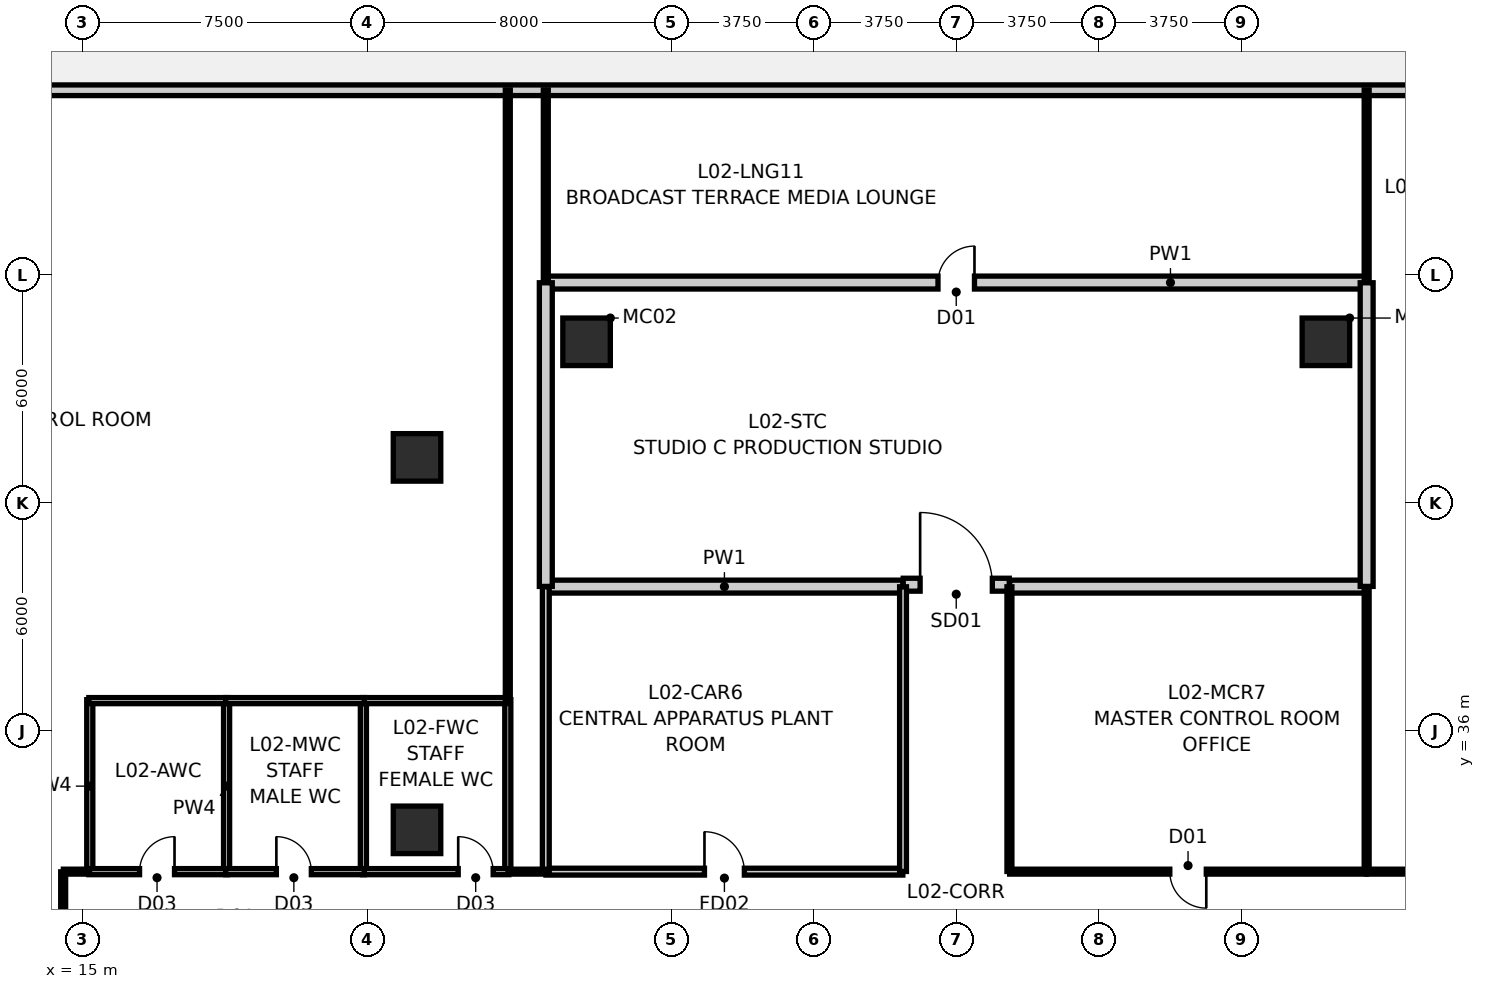
"""IFC4 building model, lengths in metres.
Left out: names, types, materials, properties, quantities, classifications, styles, units other than length and angle.
Written with IfcOpenShell. Run it as: python <this file> out.ifc"""

import sys

from ifc_helpers import new_model, si_unit, direction, frame, frame_2d, origin, origin_2d, place, context, subcontext, project, spatial, rectangle, hollow_rectangle, extrude, source, transform, mapped, element, fill, save


model = new_model("IFC4")
c1 = context("Model", 3, precision=1e-05, world=origin(), true_north=direction((0.0, 1.0)))
c2 = subcontext(c1, "Body", "Model", "MODEL_VIEW")
j1 = project(units=[si_unit("LENGTHUNIT", "METRE"), si_unit("PLANEANGLEUNIT", "RADIAN")], contexts=[c1])
p1 = place(None, origin())
s1 = spatial("IfcSite", under=j1, at=p1, CompositionType="ELEMENT")
p2 = place(p1, origin())
s2 = spatial("IfcBuilding", under=s1, at=p2, CompositionType="ELEMENT")
p3 = place(p2, frame((0.0, 0.0, 10.2)))
s3 = spatial("IfcBuildingStorey", under=s2, at=p3, CompositionType="ELEMENT", Elevation=10.2)
m1 = source(origin(), c2, "Body", "SweptSolid", [
    extrude(hollow_rectangle(XDim=1.25, YDim=1.25, WallThickness=0.07, at=origin_2d()), origin(), (0.0, 0.0, 1.0), 4.501),
])
for number, where, z_axis, x_axis in (
    (1, (47.727, 46.241, 0.0), (-0.024, 0.002, 1.0), (-0.072, -0.997, 0.0)),
    (2, (28.273, 46.241, 0.0), (0.024, 0.002, 1.0), (-0.072, 0.997, 0.0)),
):
    element("IfcColumn", number, at=place(p3, frame(where, z_axis=z_axis, x_axis=x_axis)), inside=s3, PredefinedType="COLUMN", context=c2, shape_type="MappedRepresentation", body=[
        mapped(m1, transform((0.0, 0.0, 0.0), scale=1.0)),
    ])
m2 = source(origin(), c2, "Body", "SweptSolid", [
    extrude(hollow_rectangle(XDim=1.25, YDim=1.25, WallThickness=0.07, at=origin_2d()), origin(), (0.0, 0.0, 1.0), 4.5),
])
for number, where, z_axis, x_axis in (
    (3, (23.811, 33.4, 0.0), (0.0, 0.0, 1.0), (1.0, 0.0, 0.0)),
    (4, (23.811, 43.2, 0.0), (0.0, 0.0, 1.0), (1.0, 0.0, 0.0)),
):
    element("IfcColumn", number, at=place(p3, frame(where, z_axis=z_axis, x_axis=x_axis)), inside=s3, PredefinedType="COLUMN", context=c2, shape_type="MappedRepresentation", body=[
        mapped(m2, transform((0.0, 0.0, 0.0), scale=1.0)),
    ])
p4 = place(p3, frame((6.861, 52.86, 0.0), z_axis=(0.0, 0.0, 1.0), x_axis=(1.0, 0.0, 0.0)))
e5 = element("IfcWall", 5, at=p4, inside=s3, PredefinedType="STANDARD", context=c2, shape_type="SweptSolid", body=[
    extrude(rectangle(XDim=64.278, YDim=0.28, at=frame_2d((32.139, 0.0))), origin(), (0.0, 0.0, 1.0), 4.18),
])
for number, where, z_axis, x_axis in (
    (6, (15.2, 32.275, 0.0), (0.0, 0.0, 1.0), (0.0, 1.0, 0.0)),
    (7, (18.8, 32.275, 0.0), (0.0, 0.0, 1.0), (0.0, 1.0, 0.0)),
    (8, (22.4, 32.275, 0.0), (0.0, 0.0, 1.0), (0.0, 1.0, 0.0)),
    (9, (26.2, 32.275, 0.0), (0.0, 0.0, 1.0), (0.0, 1.0, 0.0)),
):
    element("IfcWall", number, at=place(p3, frame(where, z_axis=z_axis, x_axis=x_axis)), inside=s3, PredefinedType="PLUMBINGWALL", context=c2, shape_type="SweptSolid", body=[
        extrude(rectangle(XDim=4.55, YDim=0.16, at=frame_2d((2.275, 0.0))), origin(), (0.0, 0.0, 1.0), 4.18),
    ])
p5 = place(p3, frame((22.375, 32.3, 0.0), z_axis=(0.0, 0.0, 1.0), x_axis=(1.0, 0.0, 0.0)))
e10 = element("IfcWall", 10, at=p5, inside=s3, PredefinedType="PLUMBINGWALL", context=c2, shape_type="SweptSolid", body=[
    extrude(rectangle(XDim=3.85, YDim=0.16, at=frame_2d((1.925, 0.0))), origin(), (0.0, 0.0, 1.0), 4.18),
])
p6 = place(p5, frame((2.52, 0.0, 0.0)))
e11 = element("IfcOpeningElement", 11, at=p6, cuts=e10, PredefinedType="OPENING", context=c2, shape_type="SweptSolid", body=[
    extrude(rectangle(XDim=0.92, YDim=2.1, at=frame_2d((0.46, 1.05))), frame((0.0, 0.092, 0.0), z_axis=(0.0, -1.0, 0.0), x_axis=(1.0, 0.0, 0.0)), (0.0, 0.0, 1.0), 0.184),
])
p7 = place(p3, frame((22.375, 36.8, 0.0), z_axis=(0.0, 0.0, 1.0), x_axis=(1.0, 0.0, 0.0)))
e12 = element("IfcWall", 12, at=p7, inside=s3, PredefinedType="PLUMBINGWALL", context=c2, shape_type="SweptSolid", body=[
    extrude(rectangle(XDim=3.85, YDim=0.16, at=frame_2d((1.925, 0.0))), origin(), (0.0, 0.0, 1.0), 4.18),
])
p8 = place(p3, frame((15.175, 32.3, 0.0), z_axis=(0.0, 0.0, 1.0), x_axis=(1.0, 0.0, 0.0)))
e13 = element("IfcWall", 13, at=p8, inside=s3, PredefinedType="PLUMBINGWALL", context=c2, shape_type="SweptSolid", body=[
    extrude(rectangle(XDim=3.65, YDim=0.16, at=frame_2d((1.825, 0.0))), origin(), (0.0, 0.0, 1.0), 4.18),
])
p9 = place(p8, frame((1.335, 0.0, 0.0)))
e14 = element("IfcOpeningElement", 14, at=p9, cuts=e13, PredefinedType="OPENING", context=c2, shape_type="SweptSolid", body=[
    extrude(rectangle(XDim=0.92, YDim=2.1, at=frame_2d((0.46, 1.05))), frame((0.0, 0.092, 0.0), z_axis=(0.0, -1.0, 0.0), x_axis=(1.0, 0.0, 0.0)), (0.0, 0.0, 1.0), 0.184),
])
p10 = place(p3, frame((15.175, 36.8, 0.0), z_axis=(0.0, 0.0, 1.0), x_axis=(1.0, 0.0, 0.0)))
e15 = element("IfcWall", 15, at=p10, inside=s3, PredefinedType="PLUMBINGWALL", context=c2, shape_type="SweptSolid", body=[
    extrude(rectangle(XDim=3.65, YDim=0.16, at=frame_2d((1.825, 0.0))), origin(), (0.0, 0.0, 1.0), 4.18),
])
p11 = place(p3, frame((18.775, 32.3, 0.0), z_axis=(0.0, 0.0, 1.0), x_axis=(1.0, 0.0, 0.0)))
e16 = element("IfcWall", 16, at=p11, inside=s3, PredefinedType="PLUMBINGWALL", context=c2, shape_type="SweptSolid", body=[
    extrude(rectangle(XDim=3.65, YDim=0.16, at=frame_2d((1.825, 0.0))), origin(), (0.0, 0.0, 1.0), 4.18),
])
p12 = place(p11, frame((1.335, 0.0, 0.0)))
e17 = element("IfcOpeningElement", 17, at=p12, cuts=e16, PredefinedType="OPENING", context=c2, shape_type="SweptSolid", body=[
    extrude(rectangle(XDim=0.92, YDim=2.1, at=frame_2d((0.46, 1.05))), frame((0.0, 0.092, 0.0), z_axis=(0.0, -1.0, 0.0), x_axis=(1.0, 0.0, 0.0)), (0.0, 0.0, 1.0), 0.184),
])
p13 = place(p3, frame((18.775, 36.8, 0.0), z_axis=(0.0, 0.0, 1.0), x_axis=(1.0, 0.0, 0.0)))
e18 = element("IfcWall", 18, at=p13, inside=s3, PredefinedType="PLUMBINGWALL", context=c2, shape_type="SweptSolid", body=[
    extrude(rectangle(XDim=3.65, YDim=0.16, at=frame_2d((1.825, 0.0))), origin(), (0.0, 0.0, 1.0), 4.18),
])
p14 = place(p3, frame((27.205, 47.8, 0.0), z_axis=(0.0, 0.0, 1.0), x_axis=(1.0, 0.0, 0.0)))
e19 = element("IfcWall", 19, at=p14, inside=s3, PredefinedType="PARTITIONING", context=c2, shape_type="SweptSolid", body=[
    extrude(rectangle(XDim=21.59, YDim=0.34, at=frame_2d((10.795, 0.0))), origin(), (0.0, 0.0, 1.0), 4.18),
])
p15 = place(p14, frame((10.315, 0.0, 0.0)))
e20 = element("IfcOpeningElement", 20, at=p15, cuts=e19, PredefinedType="OPENING", context=c2, shape_type="SweptSolid", body=[
    extrude(rectangle(XDim=0.96, YDim=2.15, at=frame_2d((0.48, 1.075))), frame((0.0, 0.182, 0.0), z_axis=(0.0, -1.0, 0.0), x_axis=(1.0, 0.0, 0.0)), (0.0, 0.0, 1.0), 0.364),
])
for number, where, z_axis, x_axis in (
    (21, (27.205, 39.8, 0.0), (0.0, 0.0, 1.0), (1.0, 0.0, 0.0)),
    (22, (39.405, 39.8, 0.0), (0.0, 0.0, 1.0), (1.0, 0.0, 0.0)),
):
    element("IfcWall", number, at=place(p3, frame(where, z_axis=z_axis, x_axis=x_axis)), inside=s3, PredefinedType="PARTITIONING", context=c2, shape_type="SweptSolid", body=[
        extrude(rectangle(XDim=9.39, YDim=0.34, at=frame_2d((4.695, 0.0))), origin(), (0.0, 0.0, 1.0), 4.18),
    ])
for number, where, z_axis, x_axis in (
    (23, (27.2, 39.805, 0.0), (0.0, 0.0, 1.0), (0.0, 1.0, 0.0)),
    (24, (48.8, 39.805, 0.0), (0.0, 0.0, 1.0), (0.0, 1.0, 0.0)),
):
    element("IfcWall", number, at=place(p3, frame(where, z_axis=z_axis, x_axis=x_axis)), inside=s3, PredefinedType="PARTITIONING", context=c2, shape_type="SweptSolid", body=[
        extrude(rectangle(XDim=7.99, YDim=0.34, at=frame_2d((3.995, 0.0))), origin(), (0.0, 0.0, 1.0), 4.18),
    ])
p16 = place(p3, frame((36.605, 39.85, 0.0), z_axis=(0.0, 0.0, 1.0), x_axis=(1.0, 0.0, 0.0)))
e25 = element("IfcWall", 25, at=p16, inside=s3, PredefinedType="PARTITIONING", context=c2, shape_type="SweptSolid", body=[
    extrude(rectangle(XDim=2.79, YDim=0.34, at=frame_2d((1.395, 0.0))), origin(), (0.0, 0.0, 1.0), 4.18),
])
p17 = place(p16, frame((0.445, 0.0, 0.0)))
e26 = element("IfcOpeningElement", 26, at=p17, cuts=e25, PredefinedType="OPENING", context=c2, shape_type="SweptSolid", body=[
    extrude(rectangle(XDim=1.9, YDim=2.35, at=frame_2d((0.95, 1.175))), frame((0.0, 0.182, 0.0), z_axis=(0.0, -1.0, 0.0), x_axis=(1.0, 0.0, 0.0)), (0.0, 0.0, 1.0), 0.364),
])
p18 = place(p3, frame((27.205, 32.3, 0.0), z_axis=(0.0, 0.0, 1.0), x_axis=(1.0, 0.0, 0.0)))
e27 = element("IfcWall", 27, at=p18, inside=s3, PredefinedType="PARTITIONING", context=c2, shape_type="SweptSolid", body=[
    extrude(rectangle(XDim=9.39, YDim=0.18, at=frame_2d((4.695, 0.0))), origin(), (0.0, 0.0, 1.0), 4.18),
])
p19 = place(p18, frame((4.17, 0.0, 0.0)))
e28 = element("IfcOpeningElement", 28, at=p19, cuts=e27, PredefinedType="OPENING", context=c2, shape_type="SweptSolid", body=[
    extrude(rectangle(XDim=1.05, YDim=2.15, at=frame_2d((0.525, 1.075))), frame((0.0, 0.102, 0.0), z_axis=(0.0, -1.0, 0.0), x_axis=(1.0, 0.0, 0.0)), (0.0, 0.0, 1.0), 0.204),
])
for number, where, z_axis, x_axis in (
    (29, (36.6, 32.305, 0.0), (0.0, 0.0, 1.0), (0.0, 1.0, 0.0)),
    (30, (27.2, 32.305, 0.0), (0.0, 0.0, 1.0), (0.0, 1.0, 0.0)),
):
    element("IfcWall", number, at=place(p3, frame(where, z_axis=z_axis, x_axis=x_axis)), inside=s3, PredefinedType="PARTITIONING", context=c2, shape_type="SweptSolid", body=[
        extrude(rectangle(XDim=7.49, YDim=0.18, at=frame_2d((3.745, 0.0))), origin(), (0.0, 0.0, 1.0), 4.18),
    ])
p20 = place(p3, frame((26.2, 52.87, 0.0), z_axis=(0.0, 0.0, 1.0), x_axis=(0.0, -1.0, 0.0)))
e31 = element("IfcWall", 31, at=p20, inside=s3, PredefinedType="PARTITIONING", context=c2, shape_type="SweptSolid", body=[
    extrude(rectangle(XDim=16.065, YDim=0.13, at=frame_2d((8.033, 0.0))), origin(), (0.0, 0.0, 1.0), 4.18),
])
p21 = place(p3, frame((48.795, 32.3, 0.0), z_axis=(0.0, 0.0, 1.0), x_axis=(-1.0, 0.0, 0.0)))
e32 = element("IfcWall", 32, at=p21, inside=s3, PredefinedType="PARTITIONING", context=c2, shape_type="SweptSolid", body=[
    extrude(rectangle(XDim=9.39, YDim=0.13, at=frame_2d((4.695, 0.0))), origin(), (0.0, 0.0, 1.0), 4.18),
])
p22 = place(p21, frame((4.215, 0.0, 0.0)))
e33 = element("IfcOpeningElement", 33, at=p22, cuts=e32, PredefinedType="OPENING", context=c2, shape_type="SweptSolid", body=[
    extrude(rectangle(XDim=0.96, YDim=2.15, at=frame_2d((0.48, 1.075))), frame((0.0, 0.077, 0.0), z_axis=(0.0, -1.0, 0.0), x_axis=(1.0, 0.0, 0.0)), (0.0, 0.0, 1.0), 0.154),
])
for number, where, z_axis, x_axis in (
    (34, (39.4, 32.305, 0.0), (0.0, 0.0, 1.0), (0.0, 1.0, 0.0)),
    (35, (48.8, 32.305, 0.0), (0.0, 0.0, 1.0), (0.0, 1.0, 0.0)),
):
    element("IfcWall", number, at=place(p3, frame(where, z_axis=z_axis, x_axis=x_axis)), inside=s3, PredefinedType="PARTITIONING", context=c2, shape_type="SweptSolid", body=[
        extrude(rectangle(XDim=7.49, YDim=0.13, at=frame_2d((3.745, 0.0))), origin(), (0.0, 0.0, 1.0), 4.18),
    ])
for number, where, z_axis, x_axis in (
    (36, (48.8, 47.805, 0.0), (0.0, 0.0, 1.0), (0.0, 1.0, 0.0)),
    (37, (27.2, 47.805, 0.0), (0.0, 0.0, 1.0), (0.0, 1.0, 0.0)),
):
    element("IfcWall", number, at=place(p3, frame(where, z_axis=z_axis, x_axis=x_axis)), inside=s3, PredefinedType="PARTITIONING", context=c2, shape_type="SweptSolid", body=[
        extrude(rectangle(XDim=5.065, YDim=0.13, at=frame_2d((2.533, 0.0))), origin(), (0.0, 0.0, 1.0), 4.18),
    ])
p23 = place(p3, frame((48.805, 32.3, 0.0), z_axis=(0.0, 0.0, 1.0), x_axis=(1.0, 0.0, 0.0)))
e38 = element("IfcWall", 38, at=p23, inside=s3, PredefinedType="PARTITIONING", context=c2, shape_type="SweptSolid", body=[
    extrude(rectangle(XDim=3.69, YDim=0.13, at=frame_2d((1.845, 0.0))), origin(), (0.0, 0.0, 1.0), 4.18),
])
p24 = place(p23, frame((1.365, 0.0, 0.0)))
e39 = element("IfcOpeningElement", 39, at=p24, cuts=e38, PredefinedType="OPENING", context=c2, shape_type="SweptSolid", body=[
    extrude(rectangle(XDim=0.96, YDim=2.15, at=frame_2d((0.48, 1.075))), frame((0.0, 0.077, 0.0), z_axis=(0.0, -1.0, 0.0), x_axis=(1.0, 0.0, 0.0)), (0.0, 0.0, 1.0), 0.154),
])
p25 = place(p3, frame((14.5, 30.105, 0.0), z_axis=(0.0, 0.0, 1.0), x_axis=(0.0, 1.0, 0.0)))
e40 = element("IfcWall", 40, at=p25, inside=s3, PredefinedType="PARTITIONING", context=c2, shape_type="SweptSolid", body=[
    extrude(rectangle(XDim=2.19, YDim=0.13, at=frame_2d((1.095, 0.0))), origin(), (0.0, 0.0, 1.0), 4.18),
])
p26 = place(p3, frame((26.205, 32.3, 0.0), z_axis=(0.0, 0.0, 1.0), x_axis=(1.0, 0.0, 0.0)))
e41 = element("IfcWall", 41, at=p26, inside=s3, PredefinedType="PARTITIONING", context=c2, shape_type="SweptSolid", body=[
    extrude(rectangle(XDim=0.99, YDim=0.13, at=frame_2d((0.495, 0.0))), origin(), (0.0, 0.0, 1.0), 4.18),
])
p27 = place(p3, frame((14.505, 32.3, 0.0), z_axis=(0.0, 0.0, 1.0), x_axis=(1.0, 0.0, 0.0)))
e42 = element("IfcWall", 42, at=p27, inside=s3, PredefinedType="PARTITIONING", context=c2, shape_type="SweptSolid", body=[
    extrude(rectangle(XDim=0.69, YDim=0.13, at=frame_2d((0.345, 0.0))), origin(), (0.0, 0.0, 1.0), 4.18),
])
p28 = place(p6, origin())
e43 = element("IfcDoor", 43, at=p28, inside=s3, OperationType="SINGLE_SWING_LEFT", PredefinedType="DOOR", context=c2, shape_type="SweptSolid", body=[
    extrude(rectangle(XDim=0.92, YDim=2.1, at=frame_2d((0.46, 1.05))), frame((0.0, 0.025, 0.0), z_axis=(0.0, -1.0, 0.0), x_axis=(1.0, 0.0, 0.0)), (0.0, 0.0, 1.0), 0.05),
])
fill(e11, e43)
p29 = place(p9, origin())
e44 = element("IfcDoor", 44, at=p29, inside=s3, OperationType="SINGLE_SWING_RIGHT", PredefinedType="DOOR", context=c2, shape_type="SweptSolid", body=[
    extrude(rectangle(XDim=0.92, YDim=2.1, at=frame_2d((0.46, 1.05))), frame((0.0, 0.025, 0.0), z_axis=(0.0, -1.0, 0.0), x_axis=(1.0, 0.0, 0.0)), (0.0, 0.0, 1.0), 0.05),
])
fill(e14, e44)
p30 = place(p12, origin())
e45 = element("IfcDoor", 45, at=p30, inside=s3, OperationType="SINGLE_SWING_LEFT", PredefinedType="DOOR", context=c2, shape_type="SweptSolid", body=[
    extrude(rectangle(XDim=0.92, YDim=2.1, at=frame_2d((0.46, 1.05))), frame((0.0, 0.025, 0.0), z_axis=(0.0, -1.0, 0.0), x_axis=(1.0, 0.0, 0.0)), (0.0, 0.0, 1.0), 0.05),
])
fill(e17, e45)
p31 = place(p15, origin())
e46 = element("IfcDoor", 46, at=p31, inside=s3, OperationType="SINGLE_SWING_RIGHT", PredefinedType="DOOR", context=c2, shape_type="SweptSolid", body=[
    extrude(rectangle(XDim=0.96, YDim=2.15, at=frame_2d((0.48, 1.075))), frame((0.0, 0.025, 0.0), z_axis=(0.0, -1.0, 0.0), x_axis=(1.0, 0.0, 0.0)), (0.0, 0.0, 1.0), 0.05),
])
fill(e20, e46)
p32 = place(p17, origin())
e47 = element("IfcDoor", 47, at=p32, inside=s3, OperationType="DOUBLE_DOOR_SINGLE_SWING", PredefinedType="DOOR", context=c2, shape_type="SweptSolid", body=[
    extrude(rectangle(XDim=1.9, YDim=2.35, at=frame_2d((0.95, 1.175))), frame((0.0, 0.025, 0.0), z_axis=(0.0, -1.0, 0.0), x_axis=(1.0, 0.0, 0.0)), (0.0, 0.0, 1.0), 0.05),
])
fill(e26, e47)
p33 = place(p19, origin())
e48 = element("IfcDoor", 48, at=p33, inside=s3, OperationType="SINGLE_SWING_LEFT", PredefinedType="DOOR", context=c2, shape_type="SweptSolid", body=[
    extrude(rectangle(XDim=1.05, YDim=2.15, at=frame_2d((0.525, 1.075))), frame((0.0, 0.025, 0.0), z_axis=(0.0, -1.0, 0.0), x_axis=(1.0, 0.0, 0.0)), (0.0, 0.0, 1.0), 0.05),
])
fill(e28, e48)
p34 = place(p22, origin())
e49 = element("IfcDoor", 49, at=p34, inside=s3, OperationType="SINGLE_SWING_LEFT", PredefinedType="DOOR", context=c2, shape_type="SweptSolid", body=[
    extrude(rectangle(XDim=0.96, YDim=2.15, at=frame_2d((0.48, 1.075))), frame((0.0, 0.025, 0.0), z_axis=(0.0, -1.0, 0.0), x_axis=(1.0, 0.0, 0.0)), (0.0, 0.0, 1.0), 0.05),
])
fill(e33, e49)
save(model, sys.argv[1])
